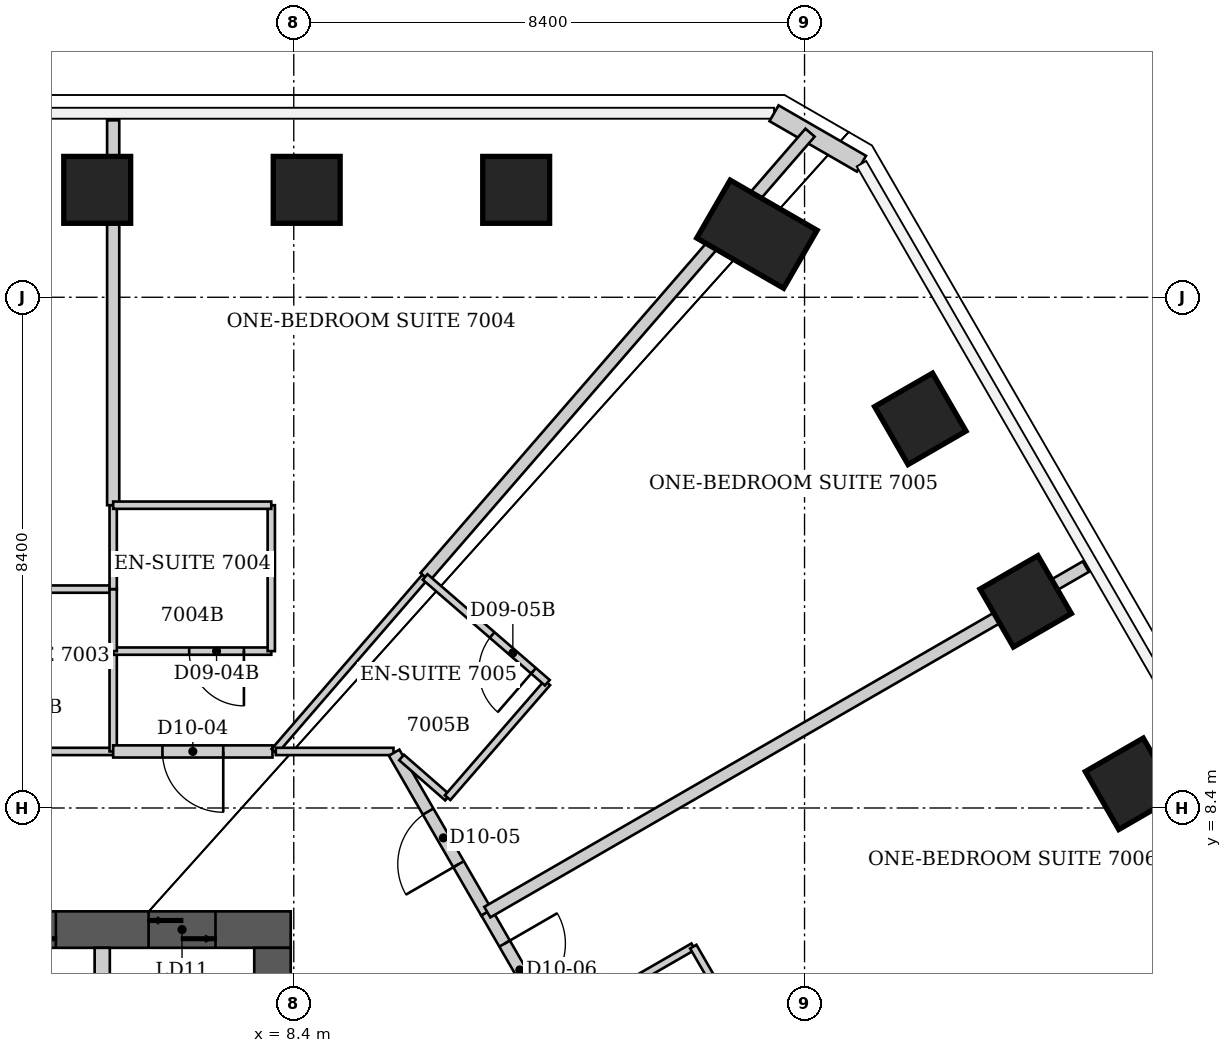
"""IFC4 building model, lengths in metres.
Left out: names, types, materials, properties, quantities, classifications, styles, units other than length and angle.
Written with IfcOpenShell. Run it as: python <this file> out.ifc"""

import sys

from ifc_helpers import new_model, si_unit, direction, frame, frame_2d, origin, origin_2d, place, context, subcontext, project, spatial, rectangle, extrude, element, fill, save


model = new_model("IFC4")
c1 = context("Model", 3, precision=1e-05, world=origin(), true_north=direction((0.0, 1.0)))
c2 = subcontext(c1, "Body", "Model", "MODEL_VIEW")
j1 = project(units=[si_unit("LENGTHUNIT", "METRE"), si_unit("PLANEANGLEUNIT", "RADIAN")], contexts=[c1])
p1 = place(None, origin())
s1 = spatial("IfcSite", under=j1, at=p1, CompositionType="ELEMENT")
p2 = place(p1, origin())
s2 = spatial("IfcBuilding", under=s1, at=p2, CompositionType="ELEMENT")
p3 = place(p2, frame((0.0, 0.0, 279.8)))
s3 = spatial("IfcBuildingStorey", under=s2, at=p3, CompositionType="ELEMENT", Elevation=279.8)
for number, where, z_axis, x_axis in (
    (1, (5.167, 18.566, 0.0), (0.0, 0.0, 1.0), (0.0, 1.0, 0.0)),
    (2, (8.613, 18.566, 0.0), (0.0, 0.0, 1.0), (0.0, 1.0, 0.0)),
    (3, (12.058, 18.566, 0.0), (0.0, 0.0, 1.0), (0.0, 1.0, 0.0)),
):
    element("IfcColumn", number, at=place(p3, frame(where, z_axis=z_axis, x_axis=x_axis)), inside=s3, PredefinedType="COLUMN", context=c2, shape_type="SweptSolid", body=[
        extrude(rectangle(XDim=1.1, YDim=1.1, at=origin_2d()), origin(), (0.0, 0.0, 1.0), 3.8),
    ])
p4 = place(p3, frame((16.017, 17.837, 0.0), z_axis=(0.0, 0.0, 1.0), x_axis=(0.5, 0.866025403784, 0.0)))
e4 = element("IfcColumn", 4, at=p4, inside=s3, PredefinedType="COLUMN", context=c2, shape_type="SweptSolid", body=[
    extrude(rectangle(XDim=1.1, YDim=1.65, at=origin_2d()), origin(), (0.0, 0.0, 1.0), 3.8),
])
for number, where, z_axis, x_axis in (
    (5, (18.704, 14.8, 0.0), (0.0, 0.0, 1.0), (0.866, 0.5, 0.0)),
    (6, (20.437, 11.799, 0.0), (0.0, 0.0, 1.0), (0.866, 0.5, 0.0)),
    (7, (22.169, 8.798, 0.0), (0.0, 0.0, 1.0), (0.866, 0.5, 0.0)),
):
    element("IfcColumn", number, at=place(p3, frame(where, z_axis=z_axis, x_axis=x_axis)), inside=s3, PredefinedType="COLUMN", context=c2, shape_type="SweptSolid", body=[
        extrude(rectangle(XDim=1.1, YDim=1.1, at=origin_2d()), origin(), (0.0, 0.0, 1.0), 3.8),
    ])
p5 = place(p3, frame((-8.35, 6.4, 0.0), z_axis=(0.0, 0.0, 1.0), x_axis=(1.0, 0.0, 0.0)))
e8 = element("IfcWall", 8, at=p5, inside=s3, PredefinedType="SHEAR", context=c2, shape_type="SweptSolid", body=[
    extrude(rectangle(XDim=16.7, YDim=0.6, at=frame_2d((8.35, 0.0))), origin(), (0.0, 0.0, 1.0), 3.8),
])
p6 = place(p5, frame((6.488, 0.0, 0.0)))
e9 = element("IfcOpeningElement", 9, at=p6, cuts=e8, PredefinedType="OPENING", context=c2, shape_type="SweptSolid", body=[
    extrude(rectangle(XDim=1.1, YDim=2.1, at=frame_2d((0.55, 1.05))), frame((0.0, 0.3, 0.0), z_axis=(0.0, -1.0, 0.0), x_axis=(1.0, 0.0, 0.0)), (0.0, 0.0, 1.0), 0.6),
])
p7 = place(p5, frame((9.113, 0.0, 0.0)))
e10 = element("IfcOpeningElement", 10, at=p7, cuts=e8, PredefinedType="OPENING", context=c2, shape_type="SweptSolid", body=[
    extrude(rectangle(XDim=1.1, YDim=2.1, at=frame_2d((0.55, 1.05))), frame((0.0, 0.3, 0.0), z_axis=(0.0, -1.0, 0.0), x_axis=(1.0, 0.0, 0.0)), (0.0, 0.0, 1.0), 0.6),
])
p8 = place(p5, frame((11.738, 0.0, 0.0)))
e11 = element("IfcOpeningElement", 11, at=p8, cuts=e8, PredefinedType="OPENING", context=c2, shape_type="SweptSolid", body=[
    extrude(rectangle(XDim=1.1, YDim=2.1, at=frame_2d((0.55, 1.05))), frame((0.0, 0.3, 0.0), z_axis=(0.0, -1.0, 0.0), x_axis=(1.0, 0.0, 0.0)), (0.0, 0.0, 1.0), 0.6),
])
p9 = place(p5, frame((14.363, 0.0, 0.0)))
e12 = element("IfcOpeningElement", 12, at=p9, cuts=e8, PredefinedType="OPENING", context=c2, shape_type="SweptSolid", body=[
    extrude(rectangle(XDim=1.1, YDim=2.1, at=frame_2d((0.55, 1.05))), frame((0.0, 0.3, 0.0), z_axis=(0.0, -1.0, 0.0), x_axis=(1.0, 0.0, 0.0)), (0.0, 0.0, 1.0), 0.6),
])
p10 = place(p3, frame((8.05, -6.1, 0.0), z_axis=(0.0, 0.0, 1.0), x_axis=(0.0, 1.0, 0.0)))
e13 = element("IfcWall", 13, at=p10, inside=s3, PredefinedType="SHEAR", context=c2, shape_type="SweptSolid", body=[
    extrude(rectangle(XDim=12.2, YDim=0.6, at=frame_2d((6.1, 0.0))), origin(), (0.0, 0.0, 1.0), 3.8),
])
p11 = place(p10, frame((7.6, 0.0, 0.0)))
e14 = element("IfcOpeningElement", 14, at=p11, cuts=e13, PredefinedType="OPENING", context=c2, shape_type="SweptSolid", body=[
    extrude(rectangle(XDim=1.2, YDim=2.2, at=frame_2d((0.6, 1.1))), frame((0.0, 0.3, 0.0), z_axis=(0.0, -1.0, 0.0), x_axis=(1.0, 0.0, 0.0)), (0.0, 0.0, 1.0), 0.6),
])
p12 = place(p3, frame((5.25, 3.35, 0.0), z_axis=(0.0, 0.0, 1.0), x_axis=(0.0, 1.0, 0.0)))
e15 = element("IfcWall", 15, at=p12, inside=s3, PredefinedType="PARTITIONING", context=c2, shape_type="SweptSolid", body=[
    extrude(rectangle(XDim=2.75, YDim=0.25, at=frame_2d((1.375, 0.0))), origin(), (0.0, 0.0, 1.0), 3.8),
])
p13 = place(p3, frame((16.298, 19.826, 0.0), z_axis=(0.0, 0.0, 1.0), x_axis=(0.866026405774, -0.499998264499, 0.0)))
e16 = element("IfcWall", 16, at=p13, inside=s3, PredefinedType="SOLIDWALL", context=c2, shape_type="SweptSolid", body=[
    extrude(rectangle(XDim=1.66, YDim=0.3, at=frame_2d((0.83, 0.0))), origin(), (0.0, 0.0, 1.0), 3.64),
])
p14 = place(p3, frame((5.43, 9.33, 0.0), z_axis=(0.0, 0.0, 1.0), x_axis=(-1.0, 0.0, 0.0)))
e17 = element("IfcWall", 17, at=p14, inside=s3, PredefinedType="PARTITIONING", context=c2, shape_type="SweptSolid", body=[
    extrude(rectangle(XDim=2.45, YDim=0.12, at=frame_2d((1.225, 0.0))), origin(), (0.0, 0.0, 1.0), 3.64),
])
p15 = place(p3, frame((5.43, 10.98, 0.0), z_axis=(0.0, 0.0, 1.0), x_axis=(0.0, -1.0, 0.0)))
e18 = element("IfcWall", 18, at=p15, inside=s3, PredefinedType="PARTITIONING", context=c2, shape_type="SweptSolid", body=[
    extrude(rectangle(XDim=1.65, YDim=0.12, at=frame_2d((0.825, 0.0))), origin(), (0.0, 0.0, 1.0), 3.64),
])
p16 = place(p3, frame((5.43, 10.98, 0.0), z_axis=(0.0, 0.0, 1.0), x_axis=(1.0, 0.0, 0.0)))
e19 = element("IfcWall", 19, at=p16, inside=s3, PredefinedType="PARTITIONING", context=c2, shape_type="SweptSolid", body=[
    extrude(rectangle(XDim=2.6, YDim=0.12, at=frame_2d((1.3, 0.0))), origin(), (0.0, 0.0, 1.0), 3.64),
])
p17 = place(p16, frame((1.25, 0.0, 0.0)))
e20 = element("IfcOpeningElement", 20, at=p17, cuts=e19, PredefinedType="OPENING", context=c2, shape_type="SweptSolid", body=[
    extrude(rectangle(XDim=0.9, YDim=2.03, at=frame_2d((0.45, 1.015))), frame((0.0, 0.06, 0.0), z_axis=(0.0, -1.0, 0.0), x_axis=(1.0, 0.0, 0.0)), (0.0, 0.0, 1.0), 0.12),
])
p18 = place(p3, frame((5.43, 12.0, 0.0), z_axis=(0.0, 0.0, 1.0), x_axis=(-1.0, 0.0, 0.0)))
e21 = element("IfcWall", 21, at=p18, inside=s3, PredefinedType="PARTITIONING", context=c2, shape_type="SweptSolid", body=[
    extrude(rectangle(XDim=2.45, YDim=0.12, at=frame_2d((1.225, 0.0))), origin(), (0.0, 0.0, 1.0), 3.64),
])
p19 = place(p3, frame((5.43, 12.0, 0.0), z_axis=(0.0, 0.0, 1.0), x_axis=(0.0, -1.0, 0.0)))
e22 = element("IfcWall", 22, at=p19, inside=s3, PredefinedType="PARTITIONING", context=c2, shape_type="SweptSolid", body=[
    extrude(rectangle(XDim=1.02, YDim=0.12, at=frame_2d((0.51, 0.0))), origin(), (0.0, 0.0, 1.0), 3.64),
])
p20 = place(p3, frame((5.43, 13.38, 0.0), z_axis=(0.0, 0.0, 1.0), x_axis=(0.0, -1.0, 0.0)))
e23 = element("IfcWall", 23, at=p20, inside=s3, PredefinedType="PARTITIONING", context=c2, shape_type="SweptSolid", body=[
    extrude(rectangle(XDim=1.38, YDim=0.12, at=frame_2d((0.69, 0.0))), origin(), (0.0, 0.0, 1.0), 3.64),
])
p21 = place(p3, frame((5.43, 19.71, 0.0), z_axis=(0.0, 0.0, 1.0), x_axis=(0.0, -1.0, 0.0)))
e24 = element("IfcWall", 24, at=p21, inside=s3, PredefinedType="PARTITIONING", context=c2, shape_type="SweptSolid", body=[
    extrude(rectangle(XDim=6.33, YDim=0.2, at=frame_2d((3.165, 0.0))), origin(), (0.0, 0.0, 1.0), 3.64),
])
p22 = place(p3, frame((8.03, 10.98, 0.0), z_axis=(0.0, 0.0, 1.0), x_axis=(0.0, 1.0, 0.0)))
e25 = element("IfcWall", 25, at=p22, inside=s3, PredefinedType="PARTITIONING", context=c2, shape_type="SweptSolid", body=[
    extrude(rectangle(XDim=2.4, YDim=0.12, at=frame_2d((1.2, 0.0))), origin(), (0.0, 0.0, 1.0), 3.64),
])
p23 = place(p3, frame((8.03, 13.38, 0.0), z_axis=(0.0, 0.0, 1.0), x_axis=(-1.0, 0.0, 0.0)))
e26 = element("IfcWall", 26, at=p23, inside=s3, PredefinedType="PARTITIONING", context=c2, shape_type="SweptSolid", body=[
    extrude(rectangle(XDim=2.6, YDim=0.12, at=frame_2d((1.3, 0.0))), origin(), (0.0, 0.0, 1.0), 3.64),
])
p24 = place(p3, frame((8.05, 9.33, 0.0), z_axis=(0.0, 0.0, 1.0), x_axis=(-1.0, 0.0, 0.0)))
e27 = element("IfcWall", 27, at=p24, inside=s3, PredefinedType="PARTITIONING", context=c2, shape_type="SweptSolid", body=[
    extrude(rectangle(XDim=2.62, YDim=0.2, at=frame_2d((1.31, 0.0))), origin(), (0.0, 0.0, 1.0), 3.64),
])
p25 = place(p24, frame((0.81, 0.0, 0.0)))
e28 = element("IfcOpeningElement", 28, at=p25, cuts=e27, PredefinedType="OPENING", context=c2, shape_type="SweptSolid", body=[
    extrude(rectangle(XDim=1.0, YDim=2.13, at=frame_2d((0.5, 1.065))), frame((0.0, 0.1, 0.0), z_axis=(0.0, -1.0, 0.0), x_axis=(1.0, 0.0, 0.0)), (0.0, 0.0, 1.0), 0.2),
])
p26 = place(p3, frame((8.08, 9.33, 0.0), z_axis=(0.0, 0.0, 1.0), x_axis=(0.653839376009, 0.756633379108, 0.0)))
e29 = element("IfcWall", 29, at=p26, inside=s3, PredefinedType="PARTITIONING", context=c2, shape_type="SweptSolid", body=[
    extrude(rectangle(XDim=3.793, YDim=0.12, at=frame_2d((1.896, 0.0))), origin(), (0.0, 0.0, 1.0), 3.64),
])
p27 = place(p3, frame((10.04, 9.33, 0.0), z_axis=(0.0, 0.0, 1.0), x_axis=(-1.0, 0.0, 0.0)))
e30 = element("IfcWall", 30, at=p27, inside=s3, PredefinedType="PARTITIONING", context=c2, shape_type="SweptSolid", body=[
    extrude(rectangle(XDim=1.935, YDim=0.12, at=frame_2d((0.968, 0.0))), origin(), (0.0, 0.0, 1.0), 3.64),
])
p28 = place(p3, frame((10.05, 9.31, 0.0), z_axis=(0.0, 0.0, 1.0), x_axis=(0.500374001214, -0.865809366379, 0.0)))
e31 = element("IfcWall", 31, at=p28, inside=s3, PredefinedType="PARTITIONING", context=c2, shape_type="SweptSolid", body=[
    extrude(rectangle(XDim=3.038, YDim=0.2, at=frame_2d((1.519, 0.0))), origin(), (0.0, 0.0, 1.0), 3.64),
])
p29 = place(p28, frame((1.119, 0.0, 0.0)))
e32 = element("IfcOpeningElement", 32, at=p29, cuts=e31, PredefinedType="OPENING", context=c2, shape_type="SweptSolid", body=[
    extrude(rectangle(XDim=1.0, YDim=2.13, at=frame_2d((0.5, 1.065))), frame((0.0, 0.1, 0.0), z_axis=(0.0, -1.0, 0.0), x_axis=(1.0, 0.0, 0.0)), (0.0, 0.0, 1.0), 0.2),
])
p30 = place(p3, frame((10.173, 9.231, 0.0), z_axis=(0.0, 0.0, 1.0), x_axis=(0.753223340044, -0.657764851609, 0.0)))
e33 = element("IfcWall", 33, at=p30, inside=s3, PredefinedType="PARTITIONING", context=c2, shape_type="SweptSolid", body=[
    extrude(rectangle(XDim=1.005, YDim=0.12, at=frame_2d((0.502, 0.0))), origin(), (0.0, 0.0, 1.0), 3.64),
])
p31 = place(p3, frame((10.56, 12.2, 0.0), z_axis=(0.0, 0.0, 1.0), x_axis=(0.654769010763, 0.7558290432, 0.0)))
e34 = element("IfcWall", 34, at=p31, inside=s3, PredefinedType="PARTITIONING", context=c2, shape_type="SweptSolid", body=[
    extrude(rectangle(XDim=9.668, YDim=0.2, at=frame_2d((4.834, 0.0))), origin(), (0.0, 0.0, 1.0), 3.64),
])
p32 = place(p3, frame((10.93, 8.57, 0.0), z_axis=(0.0, 0.0, 1.0), x_axis=(0.655439261345, 0.755247889561, 0.0)))
e35 = element("IfcWall", 35, at=p32, inside=s3, PredefinedType="PARTITIONING", context=c2, shape_type="SweptSolid", body=[
    extrude(rectangle(XDim=2.502, YDim=0.12, at=frame_2d((1.251, 0.0))), origin(), (0.0, 0.0, 1.0), 3.64),
])
p33 = place(p3, frame((11.572, 6.681, 0.0), z_axis=(0.0, 0.0, 1.0), x_axis=(0.500074377092, -0.865982457891, 0.0)))
e36 = element("IfcWall", 36, at=p33, inside=s3, PredefinedType="PARTITIONING", context=c2, shape_type="SweptSolid", body=[
    extrude(rectangle(XDim=2.182, YDim=0.2, at=frame_2d((1.091, 0.0))), origin(), (0.0, 0.0, 1.0), 3.64),
])
p34 = place(p33, frame((0.591, 0.0, 0.0)))
e37 = element("IfcOpeningElement", 37, at=p34, cuts=e36, PredefinedType="OPENING", context=c2, shape_type="SweptSolid", body=[
    extrude(rectangle(XDim=1.0, YDim=2.13, at=frame_2d((0.5, 1.065))), frame((0.0, 0.1, 0.0), z_axis=(0.0, -1.0, 0.0), x_axis=(1.0, 0.0, 0.0)), (0.0, 0.0, 1.0), 0.2),
])
p35 = place(p3, frame((12.57, 10.46, 0.0), z_axis=(0.0, 0.0, 1.0), x_axis=(-0.756064683054, 0.654496902238, 0.0)))
e38 = element("IfcWall", 38, at=p35, inside=s3, PredefinedType="PARTITIONING", context=c2, shape_type="SweptSolid", body=[
    extrude(rectangle(XDim=2.658, YDim=0.12, at=frame_2d((1.329, 0.0))), origin(), (0.0, 0.0, 1.0), 3.64),
])
p36 = place(p35, frame((0.3, 0.0, 0.0)))
e39 = element("IfcOpeningElement", 39, at=p36, cuts=e38, PredefinedType="OPENING", context=c2, shape_type="SweptSolid", body=[
    extrude(rectangle(XDim=0.9, YDim=2.03, at=frame_2d((0.45, 1.015))), frame((0.0, 0.06, 0.0), z_axis=(0.0, -1.0, 0.0), x_axis=(1.0, 0.0, 0.0)), (0.0, 0.0, 1.0), 0.12),
])
p37 = place(p3, frame((14.97, 6.12, 0.0), z_axis=(0.0, 0.0, 1.0), x_axis=(-0.866615255992, -0.498976951453, 0.0)))
e40 = element("IfcWall", 40, at=p37, inside=s3, PredefinedType="PARTITIONING", context=c2, shape_type="SweptSolid", body=[
    extrude(rectangle(XDim=2.666, YDim=0.12, at=frame_2d((1.333, 0.0))), origin(), (0.0, 0.0, 1.0), 3.64),
])
p38 = place(p37, frame((1.466, 0.0, 0.0)))
e41 = element("IfcOpeningElement", 41, at=p38, cuts=e40, PredefinedType="OPENING", context=c2, shape_type="SweptSolid", body=[
    extrude(rectangle(XDim=0.9, YDim=2.03, at=frame_2d((0.45, 1.015))), frame((0.0, 0.06, 0.0), z_axis=(0.0, -1.0, 0.0), x_axis=(1.0, 0.0, 0.0)), (0.0, 0.0, 1.0), 0.12),
])
p39 = place(p3, frame((16.22, 3.96, 0.0), z_axis=(0.0, 0.0, 1.0), x_axis=(-0.500893576935, 0.865508881864, 0.0)))
e42 = element("IfcWall", 42, at=p39, inside=s3, PredefinedType="PARTITIONING", context=c2, shape_type="SweptSolid", body=[
    extrude(rectangle(XDim=2.496, YDim=0.12, at=frame_2d((1.248, 0.0))), origin(), (0.0, 0.0, 1.0), 3.64),
])
p40 = place(p3, frame((21.426, 12.37, 0.0), z_axis=(0.0, 0.0, 1.0), x_axis=(-0.866034991525, -0.499983393178, 0.0)))
e43 = element("IfcWall", 43, at=p40, inside=s3, PredefinedType="PARTITIONING", context=c2, shape_type="SweptSolid", body=[
    extrude(rectangle(XDim=11.366, YDim=0.2, at=frame_2d((5.683, 0.0))), origin(), (0.0, 0.0, 1.0), 2.878),
])
p41 = place(p25, origin())
e44 = element("IfcDoor", 44, at=p41, inside=s3, OperationType="SINGLE_SWING_LEFT", PredefinedType="DOOR", context=c2, shape_type="SweptSolid", body=[
    extrude(rectangle(XDim=1.0, YDim=2.13, at=frame_2d((0.5, 1.065))), frame((0.0, 0.025, 0.0), z_axis=(0.0, -1.0, 0.0), x_axis=(1.0, 0.0, 0.0)), (0.0, 0.0, 1.0), 0.05),
])
fill(e28, e44)
p42 = place(p17, origin())
e45 = element("IfcDoor", 45, at=p42, inside=s3, OperationType="SINGLE_SWING_RIGHT", PredefinedType="DOOR", context=c2, shape_type="SweptSolid", body=[
    extrude(rectangle(XDim=0.9, YDim=2.03, at=frame_2d((0.45, 1.015))), frame((0.0, 0.025, 0.0), z_axis=(0.0, -1.0, 0.0), x_axis=(1.0, 0.0, 0.0)), (0.0, 0.0, 1.0), 0.05),
])
fill(e20, e45)
p43 = place(p29, origin())
e46 = element("IfcDoor", 46, at=p43, inside=s3, OperationType="SINGLE_SWING_RIGHT", PredefinedType="DOOR", context=c2, shape_type="SweptSolid", body=[
    extrude(rectangle(XDim=1.0, YDim=2.13, at=frame_2d((0.5, 1.065))), frame((0.0, 0.025, 0.0), z_axis=(0.0, -1.0, 0.0), x_axis=(1.0, 0.0, 0.0)), (0.0, 0.0, 1.0), 0.05),
])
fill(e32, e46)
p44 = place(p36, origin())
e47 = element("IfcDoor", 47, at=p44, inside=s3, OperationType="SINGLE_SWING_LEFT", PredefinedType="DOOR", context=c2, shape_type="SweptSolid", body=[
    extrude(rectangle(XDim=0.9, YDim=2.03, at=frame_2d((0.45, 1.015))), frame((0.0, 0.025, 0.0), z_axis=(0.0, -1.0, 0.0), x_axis=(1.0, 0.0, 0.0)), (0.0, 0.0, 1.0), 0.05),
])
fill(e39, e47)
p45 = place(p34, origin())
e48 = element("IfcDoor", 48, at=p45, inside=s3, OperationType="SINGLE_SWING_LEFT", PredefinedType="DOOR", context=c2, shape_type="SweptSolid", body=[
    extrude(rectangle(XDim=1.0, YDim=2.13, at=frame_2d((0.5, 1.065))), frame((0.0, 0.025, 0.0), z_axis=(0.0, -1.0, 0.0), x_axis=(1.0, 0.0, 0.0)), (0.0, 0.0, 1.0), 0.05),
])
fill(e37, e48)
p46 = place(p8, origin())
e49 = element("IfcDoor", 49, at=p46, inside=s3, OperationType="DOUBLE_DOOR_SLIDING", PredefinedType="DOOR", context=c2, shape_type="SweptSolid", body=[
    extrude(rectangle(XDim=1.1, YDim=2.1, at=frame_2d((0.55, 1.05))), frame((0.0, 0.025, 0.0), z_axis=(0.0, -1.0, 0.0), x_axis=(1.0, 0.0, 0.0)), (0.0, 0.0, 1.0), 0.05),
])
fill(e11, e49)
p47 = place(p9, origin())
e50 = element("IfcDoor", 50, at=p47, inside=s3, OperationType="DOUBLE_DOOR_SLIDING", PredefinedType="DOOR", context=c2, shape_type="SweptSolid", body=[
    extrude(rectangle(XDim=1.1, YDim=2.1, at=frame_2d((0.55, 1.05))), frame((0.0, 0.025, 0.0), z_axis=(0.0, -1.0, 0.0), x_axis=(1.0, 0.0, 0.0)), (0.0, 0.0, 1.0), 0.05),
])
fill(e12, e50)
save(model, sys.argv[1])
